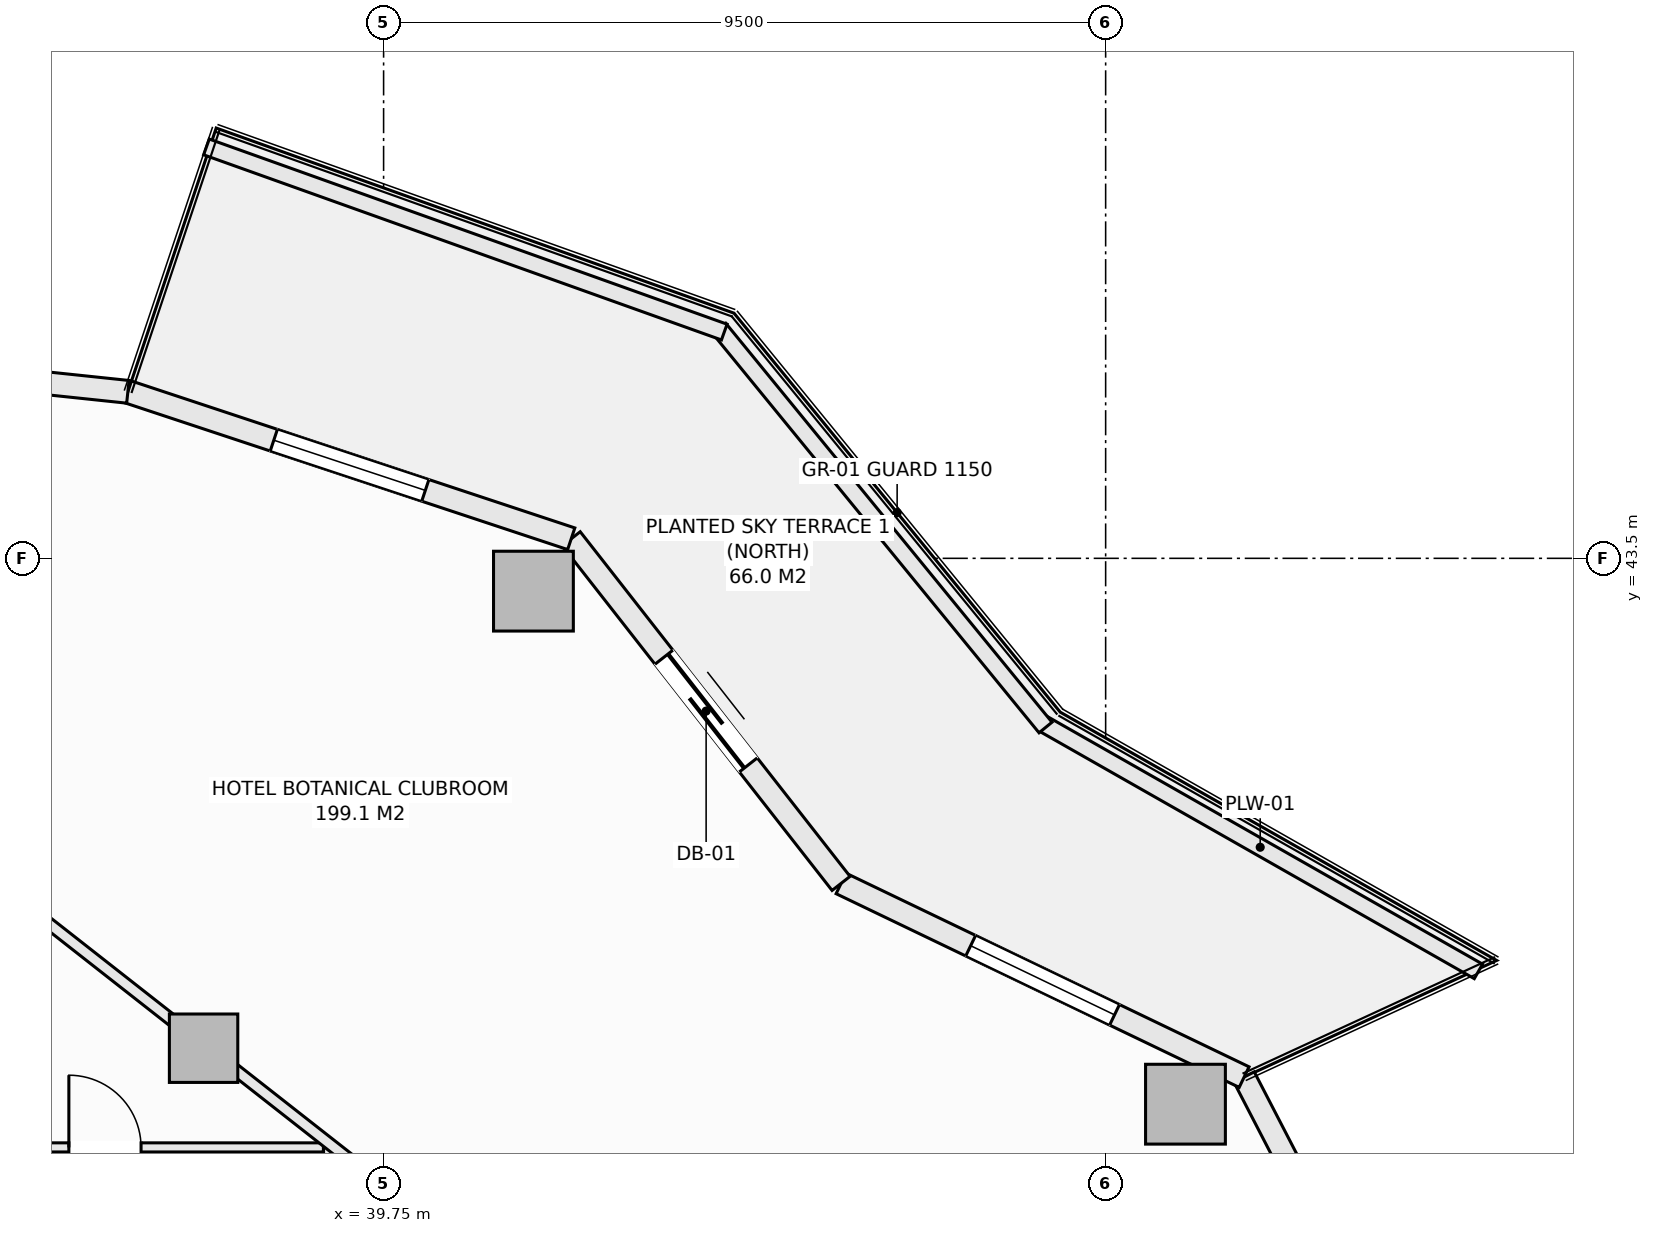
"""IFC4 building model, lengths in metres.
Left out: names, types, materials, properties, quantities, classifications, styles, units other than length and angle.
Written with IfcOpenShell. Run it as: python <this file> out.ifc"""

import sys

from ifc_helpers import new_model, si_unit, direction, frame, frame_2d, origin, origin_2d, place, context, subcontext, project, spatial, rectangle, extrude, element, fill, save


model = new_model("IFC4")
c1 = context("Model", 3, precision=1e-05, world=origin(), true_north=direction((0.0, 1.0)))
c2 = subcontext(c1, "Body", "Model", "MODEL_VIEW")
j1 = project(units=[si_unit("LENGTHUNIT", "METRE"), si_unit("PLANEANGLEUNIT", "RADIAN")], contexts=[c1])
p1 = place(None, origin())
s1 = spatial("IfcSite", under=j1, at=p1, CompositionType="ELEMENT")
p2 = place(p1, origin())
s2 = spatial("IfcBuilding", under=s1, at=p2, CompositionType="ELEMENT")
p3 = place(p2, frame((0.0, 0.0, 112.1)))
s3 = spatial("IfcBuildingStorey", under=s2, at=p3, CompositionType="ELEMENT", Elevation=112.1)
for number, where, z_axis, x_axis in (
    (1, (50.3, 36.319, -0.27), (0.0, 0.0, 1.0), (1.0, 0.0, 0.0)),
    (2, (41.721, 43.068, -0.27), (0.0, 0.0, 1.0), (1.0, 0.0, 0.0)),
):
    element("IfcColumn", number, at=place(p3, frame(where, z_axis=z_axis, x_axis=x_axis)), inside=s3, PredefinedType="COLUMN", context=c2, shape_type="SweptSolid", body=[
        extrude(rectangle(XDim=1.05, YDim=1.05, at=origin_2d()), origin(), (0.0, 0.0, 1.0), 3.4),
    ])
p4 = place(p3, frame((37.382, 37.055, -0.27), z_axis=(0.0, 0.0, 1.0), x_axis=(1.0, 0.0, 0.0)))
e3 = element("IfcColumn", 3, at=p4, inside=s3, PredefinedType="COLUMN", context=c2, shape_type="SweptSolid", body=[
    extrude(rectangle(XDim=0.9, YDim=0.9, at=origin_2d()), origin(), (0.0, 0.0, 1.0), 3.4),
])
p5 = place(p3, frame((51.072, 36.675, 0.0), z_axis=(0.0, 0.0, 1.0), x_axis=(0.459767899643, -0.888039119892, 0.0)))
e4 = element("IfcWall", 4, at=p5, inside=s3, PredefinedType="SOLIDWALL", context=c2, shape_type="SweptSolid", body=[
    extrude(rectangle(XDim=5.255, YDim=0.3, at=frame_2d((2.628, 0.0))), origin(), (0.0, 0.0, 1.0), 2.653),
])
p6 = place(p5, frame((1.578, 0.0, 0.74)))
e5 = element("IfcOpeningElement", 5, at=p6, cuts=e4, PredefinedType="OPENING", context=c2, shape_type="SweptSolid", body=[
    extrude(rectangle(XDim=2.1, YDim=1.7, at=frame_2d((1.05, 0.85))), frame((0.0, 0.16, 0.0), z_axis=(0.0, -1.0, 0.0), x_axis=(1.0, 0.0, 0.0)), (0.0, 0.0, 1.0), 0.32),
])
p7 = place(p3, frame((45.769, 39.223, 0.0), z_axis=(0.0, 0.0, 1.0), x_axis=(0.901370184739, -0.433049408339, 0.0)))
e6 = element("IfcWall", 6, at=p7, inside=s3, PredefinedType="SOLIDWALL", context=c2, shape_type="SweptSolid", body=[
    extrude(rectangle(XDim=5.884, YDim=0.3, at=frame_2d((2.942, 0.0))), origin(), (0.0, 0.0, 1.0), 2.653),
])
p8 = place(p7, frame((1.892, 0.0, 0.74)))
e7 = element("IfcOpeningElement", 7, at=p8, cuts=e6, PredefinedType="OPENING", context=c2, shape_type="SweptSolid", body=[
    extrude(rectangle(XDim=2.1, YDim=1.7, at=frame_2d((1.05, 0.85))), frame((0.0, 0.16, 0.0), z_axis=(0.0, -1.0, 0.0), x_axis=(1.0, 0.0, 0.0)), (0.0, 0.0, 1.0), 0.32),
])
p9 = place(p3, frame((42.219, 43.758, 0.0), z_axis=(0.0, 0.0, 1.0), x_axis=(0.616435134162, -0.787405693001, 0.0)))
e8 = element("IfcWall", 8, at=p9, inside=s3, PredefinedType="SOLIDWALL", context=c2, shape_type="SweptSolid", body=[
    extrude(rectangle(XDim=5.759, YDim=0.3, at=frame_2d((2.879, 0.0))), origin(), (0.0, 0.0, 1.0), 2.653),
])
p10 = place(p9, frame((1.979, 0.0, 0.0)))
e9 = element("IfcOpeningElement", 9, at=p10, cuts=e8, PredefinedType="OPENING", context=c2, shape_type="SweptSolid", body=[
    extrude(rectangle(XDim=1.8, YDim=2.25, at=frame_2d((0.9, 1.125))), frame((0.0, 0.16, 0.0), z_axis=(0.0, -1.0, 0.0), x_axis=(1.0, 0.0, 0.0)), (0.0, 0.0, 1.0), 0.32),
])
p11 = place(p3, frame((36.385, 45.691, 0.0), z_axis=(0.0, 0.0, 1.0), x_axis=(0.949238009374, -0.314558741032, 0.0)))
e10 = element("IfcWall", 10, at=p11, inside=s3, PredefinedType="SOLIDWALL", context=c2, shape_type="SweptSolid", body=[
    extrude(rectangle(XDim=6.146, YDim=0.3, at=frame_2d((3.073, 0.0))), origin(), (0.0, 0.0, 1.0), 2.653),
])
p12 = place(p11, frame((2.023, 0.0, 0.74)))
e11 = element("IfcOpeningElement", 11, at=p12, cuts=e10, PredefinedType="OPENING", context=c2, shape_type="SweptSolid", body=[
    extrude(rectangle(XDim=2.1, YDim=1.7, at=frame_2d((1.05, 0.85))), frame((0.0, 0.16, 0.0), z_axis=(0.0, -1.0, 0.0), x_axis=(1.0, 0.0, 0.0)), (0.0, 0.0, 1.0), 0.32),
])
p13 = place(p3, frame((30.125, 46.35, 0.0), z_axis=(0.0, 0.0, 1.0), x_axis=(0.994498012394, -0.104755445421, 0.0)))
e12 = element("IfcWall", 12, at=p13, inside=s3, PredefinedType="SOLIDWALL", context=c2, shape_type="SweptSolid", body=[
    extrude(rectangle(XDim=6.295, YDim=0.3, at=frame_2d((3.147, 0.0))), origin(), (0.0, 0.0, 1.0), 2.653),
])
p14 = place(p13, frame((2.097, 0.0, 0.74)))
e13 = element("IfcOpeningElement", 13, at=p14, cuts=e12, PredefinedType="OPENING", context=c2, shape_type="SweptSolid", body=[
    extrude(rectangle(XDim=2.1, YDim=1.7, at=frame_2d((1.05, 0.85))), frame((0.0, 0.16, 0.0), z_axis=(0.0, -1.0, 0.0), x_axis=(1.0, 0.0, 0.0)), (0.0, 0.0, 1.0), 0.32),
])
p15 = place(p3, frame((48.413, 41.332, 0.0), z_axis=(0.0, 0.0, 1.0), x_axis=(0.869187658335, -0.494482370361, 0.0)))
e14 = element("IfcWall", 14, at=p15, inside=s3, PredefinedType="PARAPET", context=c2, shape_type="SweptSolid", body=[
    extrude(rectangle(XDim=6.606, YDim=0.22, at=frame_2d((3.303, 0.0))), origin(), (0.0, 0.0, 1.0), 0.52),
])
p16 = place(p3, frame((44.167, 46.523, 0.0), z_axis=(0.0, 0.0, 1.0), x_axis=(0.633002467947, -0.77414977593, 0.0)))
e15 = element("IfcWall", 15, at=p16, inside=s3, PredefinedType="PARAPET", context=c2, shape_type="SweptSolid", body=[
    extrude(rectangle(XDim=6.78, YDim=0.22, at=frame_2d((3.39, 0.0))), origin(), (0.0, 0.0, 1.0), 0.52),
])
p17 = place(p3, frame((37.419, 48.913, 0.0), z_axis=(0.0, 0.0, 1.0), x_axis=(0.941632697311, -0.336642040387, 0.0)))
e16 = element("IfcWall", 16, at=p17, inside=s3, PredefinedType="PARAPET", context=c2, shape_type="SweptSolid", body=[
    extrude(rectangle(XDim=7.236, YDim=0.22, at=frame_2d((3.618, 0.0))), origin(), (0.0, 0.0, 1.0), 0.52),
])
p18 = place(p3, frame((39.02, 33.75, 0.0), z_axis=(0.0, 0.0, 1.0), x_axis=(0.0, 1.0, 0.0)))
e17 = element("IfcWall", 17, at=p18, inside=s3, PredefinedType="PARTITIONING", context=c2, shape_type="SweptSolid", body=[
    extrude(rectangle(XDim=2.0, YDim=0.12, at=frame_2d((1.0, 0.0))), origin(), (0.0, 0.0, 1.0), 3.13),
])
p19 = place(p3, frame((34.05, 35.75, 0.0), z_axis=(0.0, 0.0, 1.0), x_axis=(1.0, 0.0, 0.0)))
e18 = element("IfcWall", 18, at=p19, inside=s3, PredefinedType="PARTITIONING", context=c2, shape_type="SweptSolid", body=[
    extrude(rectangle(XDim=4.908, YDim=0.12, at=frame_2d((2.454, 0.0))), origin(), (0.0, 0.0, 1.0), 2.505),
])
p20 = place(p19, frame((1.559, 0.0, 0.0)))
e19 = element("IfcOpeningElement", 19, at=p20, cuts=e18, PredefinedType="OPENING", context=c2, shape_type="SweptSolid", body=[
    extrude(rectangle(XDim=0.95, YDim=2.1, at=frame_2d((0.475, 1.05))), frame((0.0, 0.07, 0.0), z_axis=(0.0, -1.0, 0.0), x_axis=(1.0, 0.0, 0.0)), (0.0, 0.0, 1.0), 0.14),
])
p21 = place(p3, frame((34.112, 39.661, 0.0), z_axis=(0.0, 0.0, 1.0), x_axis=(0.786863471843, -0.617127115495, 0.0)))
e20 = element("IfcWall", 20, at=p21, inside=s3, PredefinedType="PARTITIONING", context=c2, shape_type="SweptSolid", body=[
    extrude(rectangle(XDim=14.103, YDim=0.15, at=frame_2d((7.052, 0.0))), origin(), (0.0, 0.0, 1.0), 2.505),
])
p22 = place(p8, origin())
e21 = element("IfcWindow", 21, at=p22, inside=s3, PartitioningType="SINGLE_PANEL", PredefinedType="WINDOW", context=c2, shape_type="SweptSolid", body=[
    extrude(rectangle(XDim=2.1, YDim=1.7, at=frame_2d((1.05, 0.85))), frame((0.0, 0.03, 0.0), z_axis=(0.0, -1.0, 0.0), x_axis=(1.0, 0.0, 0.0)), (0.0, 0.0, 1.0), 0.06),
])
fill(e7, e21)
p23 = place(p10, origin())
e22 = element("IfcDoor", 22, at=p23, inside=s3, OperationType="SLIDING_TO_LEFT", PredefinedType="DOOR", context=c2, shape_type="SweptSolid", body=[
    extrude(rectangle(XDim=1.8, YDim=2.25, at=frame_2d((0.9, 1.125))), frame((0.0, 0.025, 0.0), z_axis=(0.0, -1.0, 0.0), x_axis=(1.0, 0.0, 0.0)), (0.0, 0.0, 1.0), 0.05),
])
fill(e9, e22)
p24 = place(p12, origin())
e23 = element("IfcWindow", 23, at=p24, inside=s3, PartitioningType="SINGLE_PANEL", PredefinedType="WINDOW", context=c2, shape_type="SweptSolid", body=[
    extrude(rectangle(XDim=2.1, YDim=1.7, at=frame_2d((1.05, 0.85))), frame((0.0, 0.03, 0.0), z_axis=(0.0, -1.0, 0.0), x_axis=(1.0, 0.0, 0.0)), (0.0, 0.0, 1.0), 0.06),
])
fill(e11, e23)
p25 = place(p20, origin())
e24 = element("IfcDoor", 24, at=p25, inside=s3, OperationType="SINGLE_SWING_LEFT", PredefinedType="DOOR", context=c2, shape_type="SweptSolid", body=[
    extrude(rectangle(XDim=0.95, YDim=2.1, at=frame_2d((0.475, 1.05))), frame((0.0, 0.025, 0.0), z_axis=(0.0, -1.0, 0.0), x_axis=(1.0, 0.0, 0.0)), (0.0, 0.0, 1.0), 0.05),
])
fill(e19, e24)
save(model, sys.argv[1])
